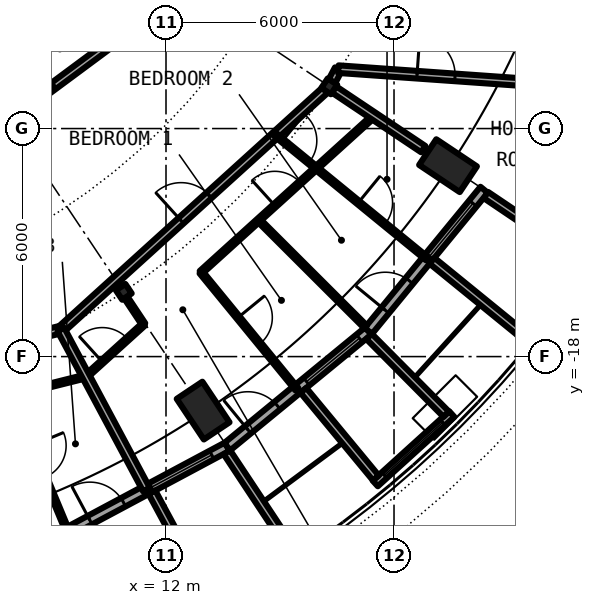
"""IFC4 building model, lengths in metres.
Left out: names, types, materials, properties, quantities, classifications, styles, units other than length and angle.
Written with IfcOpenShell. Run it as: python <this file> out.ifc"""

import sys

from ifc_helpers import new_model, si_unit, direction, frame, frame_2d, origin, origin_2d, place, context, subcontext, project, spatial, rectangle, circle, hollow_circle, i_section, extrude, element, fill, save


model = new_model("IFC4")
c1 = context("Model", 3, precision=1e-05, world=origin(), true_north=direction((0.0, 1.0)))
c2 = subcontext(c1, "Body", "Model", "MODEL_VIEW")
j1 = project(units=[si_unit("LENGTHUNIT", "METRE"), si_unit("PLANEANGLEUNIT", "RADIAN")], contexts=[c1])
p1 = place(None, origin())
s1 = spatial("IfcSite", under=j1, at=p1, CompositionType="ELEMENT")
p2 = place(p1, origin())
s2 = spatial("IfcBuilding", under=s1, at=p2, CompositionType="ELEMENT")
p3 = place(p2, frame((0.0, 0.0, 246.25)))
s3 = spatial("IfcBuildingStorey", under=s2, at=p3, CompositionType="ELEMENT", Elevation=246.25)
for number, where, z_axis, x_axis in (
    (1, (13.334, -19.955, 0.0), (-0.232, 0.347, 0.909), (-0.831, -0.556, 0.0)),
    (2, (19.955, -13.334, 0.0), (-0.347, 0.232, 0.909), (-0.556, -0.831, 0.0)),
):
    element("IfcColumn", number, at=place(p3, frame(where, z_axis=z_axis, x_axis=x_axis)), inside=s3, PredefinedType="COLUMN", context=c2, shape_type="SweptSolid", body=[
        extrude(hollow_circle(Radius=0.406, WallThickness=0.03, at=origin_2d()), origin(), (0.0, 0.0, 1.0), 3.081),
    ])
for number, where, z_axis, x_axis in (
    (3, (10.889, -16.297, 0.0), (0.0, 0.0, 1.0), (0.556, -0.831, 0.0)),
    (4, (16.297, -10.889, 0.0), (0.0, 0.0, 1.0), (0.831, -0.556, 0.0)),
):
    element("IfcColumn", number, at=place(p3, frame(where, z_axis=z_axis, x_axis=x_axis)), inside=s3, PredefinedType="COLUMN", context=c2, shape_type="SweptSolid", body=[
        extrude(i_section(OverallWidth=0.3, OverallDepth=0.3, WebThickness=0.011, FlangeThickness=0.019, FilletRadius=0.027, at=origin_2d()), origin(), (0.0, 0.0, 1.0), 3.05),
    ])
p4 = place(p3, frame((9.376, -22.635, 0.0), z_axis=(0.0, 0.0, 1.0), x_axis=(0.881903608701, 0.471429766731, 0.0)))
e5 = element("IfcWall", 5, at=p4, inside=s3, PredefinedType="SOLIDWALL", context=c2, shape_type="SweptSolid", body=[
    extrude(rectangle(XDim=4.802, YDim=0.25, at=frame_2d((2.401, 0.0))), origin(), (0.0, 0.0, 1.0), 2.7),
])
p5 = place(p4, frame((0.704, 0.0, 0.0)))
e6 = element("IfcOpeningElement", 6, at=p5, cuts=e5, PredefinedType="OPENING", context=c2, shape_type="SweptSolid", body=[
    extrude(rectangle(XDim=1.0, YDim=2.2, at=frame_2d((0.5, 1.1))), frame((0.0, 0.135, 0.0), z_axis=(0.0, -1.0, 0.0), x_axis=(1.0, 0.0, 0.0)), (0.0, 0.0, 1.0), 0.27),
])
p6 = place(p4, frame((2.542, 0.0, 0.3)))
e7 = element("IfcOpeningElement", 7, at=p6, cuts=e5, PredefinedType="OPENING", context=c2, shape_type="SweptSolid", body=[
    extrude(rectangle(XDim=1.8, YDim=2.1, at=frame_2d((0.9, 1.05))), frame((0.0, 0.135, 0.0), z_axis=(0.0, -1.0, 0.0), x_axis=(1.0, 0.0, 0.0)), (0.0, 0.0, 1.0), 0.27),
])
p7 = place(p3, frame((11.631, -21.572, -0.03), z_axis=(0.0, 0.0, 1.0), x_axis=(0.474649669009, -0.880174807473, 0.0)))
e8 = element("IfcWall", 8, at=p7, inside=s3, PredefinedType="SOLIDWALL", context=c2, shape_type="SweptSolid", body=[
    extrude(rectangle(XDim=2.991, YDim=0.2, at=frame_2d((1.496, 0.0))), origin(), (0.0, 0.0, 1.0), 2.73),
])
p8 = place(p3, frame((13.603, -20.518, -0.03), z_axis=(0.0, 0.0, 1.0), x_axis=(0.55248888476, -0.833520265031, 0.0)))
e9 = element("IfcWall", 9, at=p8, inside=s3, PredefinedType="SOLIDWALL", context=c2, shape_type="SweptSolid", body=[
    extrude(rectangle(XDim=2.882, YDim=0.2, at=frame_2d((1.441, 0.0))), origin(), (0.0, 0.0, 1.0), 2.73),
])
p9 = place(p3, frame((13.611, -20.371, 0.0), z_axis=(0.0, 0.0, 1.0), x_axis=(0.773007538262, 0.634396836208, 0.0)))
e10 = element("IfcWall", 10, at=p9, inside=s3, PredefinedType="SOLIDWALL", context=c2, shape_type="SweptSolid", body=[
    extrude(rectangle(XDim=4.803, YDim=0.25, at=frame_2d((2.402, 0.0))), origin(), (0.0, 0.0, 1.0), 2.7),
])
p10 = place(p9, frame((0.704, 0.0, 0.0)))
e11 = element("IfcOpeningElement", 11, at=p10, cuts=e10, PredefinedType="OPENING", context=c2, shape_type="SweptSolid", body=[
    extrude(rectangle(XDim=1.0, YDim=2.2, at=frame_2d((0.5, 1.1))), frame((0.0, 0.135, 0.0), z_axis=(0.0, -1.0, 0.0), x_axis=(1.0, 0.0, 0.0)), (0.0, 0.0, 1.0), 0.27),
])
p11 = place(p9, frame((2.699, 0.0, 0.3)))
e12 = element("IfcOpeningElement", 12, at=p11, cuts=e10, PredefinedType="OPENING", context=c2, shape_type="SweptSolid", body=[
    extrude(rectangle(XDim=1.8, YDim=2.1, at=frame_2d((0.9, 1.05))), frame((0.0, 0.135, 0.0), z_axis=(0.0, -1.0, 0.0), x_axis=(1.0, 0.0, 0.0)), (0.0, 0.0, 1.0), 0.27),
])
p12 = place(p3, frame((17.506, -21.338, -0.03), z_axis=(0.0, 0.0, 1.0), x_axis=(0.741016284298, 0.671487056022, 0.0)))
e13 = element("IfcWall", 13, at=p12, inside=s3, PredefinedType="SOLIDWALL", context=c2, shape_type="SweptSolid", body=[
    extrude(rectangle(XDim=2.718, YDim=0.2, at=frame_2d((1.359, 0.0))), origin(), (0.0, 0.0, 1.0), 2.73),
])
p13 = place(p12, frame((0.319, 0.0, 0.33)))
e14 = element("IfcOpeningElement", 14, at=p13, cuts=e13, PredefinedType="OPENING", context=c2, shape_type="SweptSolid", body=[
    extrude(circle(Radius=1.04, at=frame_2d((1.04, 1.04))), frame((0.0, 0.11, 0.0), z_axis=(0.0, -1.0, 0.0), x_axis=(1.0, 0.0, 0.0)), (0.0, 0.0, 1.0), 0.22),
])
p14 = place(p3, frame((15.615, -18.888, -0.03), z_axis=(0.0, 0.0, 1.0), x_axis=(0.637452521862, -0.770489638069, 0.0)))
e15 = element("IfcWall", 15, at=p14, inside=s3, PredefinedType="SOLIDWALL", context=c2, shape_type="SweptSolid", body=[
    extrude(rectangle(XDim=2.993, YDim=0.2, at=frame_2d((1.497, 0.0))), origin(), (0.0, 0.0, 1.0), 2.73),
])
p15 = place(p3, frame((17.344, -17.47, -0.03), z_axis=(0.0, 0.0, 1.0), x_axis=(0.704306055012, -0.709896457854, 0.0)))
e16 = element("IfcWall", 16, at=p15, inside=s3, PredefinedType="SOLIDWALL", context=c2, shape_type="SweptSolid", body=[
    extrude(rectangle(XDim=2.882, YDim=0.2, at=frame_2d((1.441, 0.0))), origin(), (0.0, 0.0, 1.0), 2.73),
])
p16 = place(p3, frame((17.324, -17.324, 0.0), z_axis=(0.0, 0.0, 1.0), x_axis=(0.634396836208, 0.773007538262, 0.0)))
e17 = element("IfcWall", 17, at=p16, inside=s3, PredefinedType="SOLIDWALL", context=c2, shape_type="SweptSolid", body=[
    extrude(rectangle(XDim=4.803, YDim=0.25, at=frame_2d((2.402, 0.0))), origin(), (0.0, 0.0, 1.0), 2.7),
])
p17 = place(p16, frame((0.704, 0.0, 0.0)))
e18 = element("IfcOpeningElement", 18, at=p17, cuts=e17, PredefinedType="OPENING", context=c2, shape_type="SweptSolid", body=[
    extrude(rectangle(XDim=1.0, YDim=2.2, at=frame_2d((0.5, 1.1))), frame((0.0, 0.135, 0.0), z_axis=(0.0, -1.0, 0.0), x_axis=(1.0, 0.0, 0.0)), (0.0, 0.0, 1.0), 0.27),
])
p18 = place(p16, frame((2.542, 0.0, 0.3)))
e19 = element("IfcOpeningElement", 19, at=p18, cuts=e17, PredefinedType="OPENING", context=c2, shape_type="SweptSolid", body=[
    extrude(rectangle(XDim=1.8, YDim=2.1, at=frame_2d((0.9, 1.05))), frame((0.0, 0.135, 0.0), z_axis=(0.0, -1.0, 0.0), x_axis=(1.0, 0.0, 0.0)), (0.0, 0.0, 1.0), 0.27),
])
p19 = place(p3, frame((19.0, -15.479, -0.03), z_axis=(0.0, 0.0, 1.0), x_axis=(0.775612161439, -0.631209771017, 0.0)))
e20 = element("IfcWall", 20, at=p19, inside=s3, PredefinedType="SOLIDWALL", context=c2, shape_type="SweptSolid", body=[
    extrude(rectangle(XDim=2.992, YDim=0.2, at=frame_2d((1.496, 0.0))), origin(), (0.0, 0.0, 1.0), 2.73),
])
p20 = place(p3, frame((20.419, -13.75, -0.03), z_axis=(0.0, 0.0, 1.0), x_axis=(0.829211810515, -0.558934498222, 0.0)))
e21 = element("IfcWall", 21, at=p20, inside=s3, PredefinedType="SOLIDWALL", context=c2, shape_type="SweptSolid", body=[
    extrude(rectangle(XDim=2.882, YDim=0.2, at=frame_2d((1.441, 0.0))), origin(), (0.0, 0.0, 1.0), 2.73),
])
p21 = place(p3, frame((3.959, -20.008, 0.0), z_axis=(0.0, 0.0, 1.0), x_axis=(0.970025123496, 0.243004649721, 0.0)))
e22 = element("IfcWall", 22, at=p21, inside=s3, PredefinedType="PARTITIONING", context=c2, shape_type="SweptSolid", body=[
    extrude(rectangle(XDim=6.124, YDim=0.1, at=frame_2d((3.062, 0.0))), origin(), (0.0, 0.0, 1.0), 2.7),
])
p22 = place(p21, frame((2.612, 0.0, 0.0)))
e23 = element("IfcOpeningElement", 23, at=p22, cuts=e22, PredefinedType="OPENING", context=c2, shape_type="SweptSolid", body=[
    extrude(rectangle(XDim=0.9, YDim=2.3, at=frame_2d((0.45, 1.15))), frame((0.0, 0.06, 0.0), z_axis=(0.0, -1.0, 0.0), x_axis=(1.0, 0.0, 0.0)), (0.0, 0.0, 1.0), 0.12),
])
p23 = place(p3, frame((9.899, -18.52, 0.0), z_axis=(0.0, 0.0, 1.0), x_axis=(0.741280718106, 0.671195125849, 0.0)))
e24 = element("IfcWall", 24, at=p23, inside=s3, PredefinedType="PARTITIONING", context=c2, shape_type="SweptSolid", body=[
    extrude(rectangle(XDim=2.041, YDim=0.1, at=frame_2d((1.021, 0.0))), origin(), (0.0, 0.0, 1.0), 2.7),
])
p24 = place(p23, frame((0.571, 0.0, 0.0)))
e25 = element("IfcOpeningElement", 25, at=p24, cuts=e24, PredefinedType="OPENING", context=c2, shape_type="SweptSolid", body=[
    extrude(rectangle(XDim=0.9, YDim=2.3, at=frame_2d((0.45, 1.15))), frame((0.0, 0.06, 0.0), z_axis=(0.0, -1.0, 0.0), x_axis=(1.0, 0.0, 0.0)), (0.0, 0.0, 1.0), 0.12),
])
p25 = place(p3, frame((12.92, -15.785, 0.0), z_axis=(0.0, 0.0, 1.0), x_axis=(0.74123210671, 0.671248809297, 0.0)))
e26 = element("IfcWall", 26, at=p25, inside=s3, PredefinedType="PARTITIONING", context=c2, shape_type="SweptSolid", body=[
    extrude(rectangle(XDim=6.115, YDim=0.1, at=frame_2d((3.058, 0.0))), origin(), (0.0, 0.0, 1.0), 2.7),
])
p26 = place(p25, frame((2.622, 0.0, 0.0)))
e27 = element("IfcOpeningElement", 27, at=p26, cuts=e26, PredefinedType="OPENING", context=c2, shape_type="SweptSolid", body=[
    extrude(rectangle(XDim=0.9, YDim=2.3, at=frame_2d((0.45, 1.15))), frame((0.0, 0.06, 0.0), z_axis=(0.0, -1.0, 0.0), x_axis=(1.0, 0.0, 0.0)), (0.0, 0.0, 1.0), 0.12),
])
p27 = place(p3, frame((16.367, -10.756, 0.0), z_axis=(0.0, 0.0, 1.0), x_axis=(0.465802239822, 0.884888848035, 0.0)))
e28 = element("IfcWall", 28, at=p27, inside=s3, PredefinedType="PARTITIONING", context=c2, shape_type="SweptSolid", body=[
    extrude(rectangle(XDim=0.361, YDim=0.2, at=frame_2d((0.18, 0.0))), origin(), (0.0, 0.0, 1.0), 2.7),
])
p28 = place(p3, frame((-0.001, -19.6, 0.0), z_axis=(0.0, 0.0, 1.0), x_axis=(0.970038381136, 0.242951721795, 0.0)))
e29 = element("IfcWall", 29, at=p28, inside=s3, PredefinedType="PARTITIONING", context=c2, shape_type="SweptSolid", body=[
    extrude(rectangle(XDim=9.525, YDim=0.2, at=frame_2d((4.763, 0.0))), origin(), (0.0, 0.0, 1.0), 2.45),
])
p29 = place(p28, frame((4.266, 0.0, 0.0)))
e30 = element("IfcOpeningElement", 30, at=p29, cuts=e29, PredefinedType="OPENING", context=c2, shape_type="SweptSolid", body=[
    extrude(rectangle(XDim=1.0, YDim=2.3, at=frame_2d((0.5, 1.15))), frame((0.0, 0.11, 0.0), z_axis=(0.0, -1.0, 0.0), x_axis=(1.0, 0.0, 0.0)), (0.0, 0.0, 1.0), 0.22),
])
p30 = place(p3, frame((9.239, -17.286, 0.0), z_axis=(0.0, 0.0, 1.0), x_axis=(0.740934281602, 0.671577538596, 0.0)))
e31 = element("IfcWall", 31, at=p30, inside=s3, PredefinedType="PARTITIONING", context=c2, shape_type="SweptSolid", body=[
    extrude(rectangle(XDim=9.37, YDim=0.2, at=frame_2d((4.685, 0.0))), origin(), (0.0, 0.0, 1.0), 2.45),
])
p31 = place(p30, frame((4.263, 0.0, 0.0)))
e32 = element("IfcOpeningElement", 32, at=p31, cuts=e31, PredefinedType="OPENING", context=c2, shape_type="SweptSolid", body=[
    extrude(rectangle(XDim=1.0, YDim=2.3, at=frame_2d((0.5, 1.15))), frame((0.0, 0.11, 0.0), z_axis=(0.0, -1.0, 0.0), x_axis=(1.0, 0.0, 0.0)), (0.0, 0.0, 1.0), 0.22),
])
p32 = place(p3, frame((4.354, -14.354, 0.0), z_axis=(0.0, 0.0, 1.0), x_axis=(0.80330975478, 0.595561447607, 0.0)))
e33 = element("IfcWall", 33, at=p32, inside=s3, PredefinedType="PARTITIONING", context=c2, shape_type="SweptSolid", body=[
    extrude(rectangle(XDim=8.987, YDim=0.2, at=frame_2d((4.493, 0.0))), origin(), (0.0, 0.0, 1.0), 2.7),
])
p33 = place(p32, frame((3.832, 0.0, 0.0)))
e34 = element("IfcOpeningElement", 34, at=p33, cuts=e33, PredefinedType="OPENING", context=c2, shape_type="SweptSolid", body=[
    extrude(rectangle(XDim=1.0, YDim=2.3, at=frame_2d((0.5, 1.15))), frame((0.0, 0.11, 0.0), z_axis=(0.0, -1.0, 0.0), x_axis=(1.0, 0.0, 0.0)), (0.0, 0.0, 1.0), 0.22),
])
p34 = place(p3, frame((16.535, -10.437, 0.0), z_axis=(0.0, 0.0, 1.0), x_axis=(0.997515141784, -0.070452408845, 0.0)))
e35 = element("IfcWall", 35, at=p34, inside=s3, PredefinedType="PARTITIONING", context=c2, shape_type="SweptSolid", body=[
    extrude(rectangle(XDim=5.153, YDim=0.2, at=frame_2d((2.576, 0.0))), origin(), (0.0, 0.0, 1.0), 2.7),
])
p35 = place(p34, frame((2.076, 0.0, 0.0)))
e36 = element("IfcOpeningElement", 36, at=p35, cuts=e35, PredefinedType="OPENING", context=c2, shape_type="SweptSolid", body=[
    extrude(rectangle(XDim=1.0, YDim=2.3, at=frame_2d((0.5, 1.15))), frame((0.0, 0.11, 0.0), z_axis=(0.0, -1.0, 0.0), x_axis=(1.0, 0.0, 0.0)), (0.0, 0.0, 1.0), 0.22),
])
p36 = place(p3, frame((9.234, -17.289, 0.0), z_axis=(0.0, 0.0, 1.0), x_axis=(0.471710500702, -0.881753482288, 0.0)))
e37 = element("IfcWall", 37, at=p36, inside=s3, PredefinedType="PARTITIONING", context=c2, shape_type="SweptSolid", body=[
    extrude(rectangle(XDim=4.774, YDim=0.2, at=frame_2d((2.387, 0.0))), origin(), (0.0, 0.0, 1.0), 2.7),
])
p37 = place(p3, frame((4.909, -5.958, 0.0), z_axis=(0.0, 0.0, 1.0), x_axis=(0.635941750694, -0.771737059965, 0.0)))
e38 = element("IfcWall", 38, at=p37, inside=s3, PredefinedType="PARTITIONING", context=c2, shape_type="SweptSolid", body=[
    extrude(rectangle(XDim=6.422, YDim=0.1, at=frame_2d((3.211, 0.0))), origin(), (0.0, 0.0, 1.0), 2.7),
])
p38 = place(p37, frame((4.699, 0.0, 0.0)))
e39 = element("IfcOpeningElement", 39, at=p38, cuts=e38, PredefinedType="OPENING", context=c2, shape_type="SweptSolid", body=[
    extrude(rectangle(XDim=0.9, YDim=2.3, at=frame_2d((0.45, 1.15))), frame((0.0, 0.06, 0.0), z_axis=(0.0, -1.0, 0.0), x_axis=(1.0, 0.0, 0.0)), (0.0, 0.0, 1.0), 0.12),
])
p39 = place(p37, frame((1.488, 0.0, 0.0)))
e40 = element("IfcOpeningElement", 40, at=p39, cuts=e38, PredefinedType="OPENING", context=c2, shape_type="SweptSolid", body=[
    extrude(rectangle(XDim=0.9, YDim=2.3, at=frame_2d((0.45, 1.15))), frame((0.0, 0.06, 0.0), z_axis=(0.0, -1.0, 0.0), x_axis=(1.0, 0.0, 0.0)), (0.0, 0.0, 1.0), 0.12),
])
p40 = place(p3, frame((7.391, -17.749, 0.0), z_axis=(0.0, 0.0, 1.0), x_axis=(0.38454804651, -0.923104977738, 0.0)))
e41 = element("IfcWall", 41, at=p40, inside=s3, PredefinedType="PARTITIONING", context=c2, shape_type="SweptSolid", body=[
    extrude(rectangle(XDim=5.149, YDim=0.1, at=frame_2d((2.574, 0.0))), origin(), (0.0, 0.0, 1.0), 2.7),
])
p41 = place(p40, frame((0.237, 0.0, 0.0)))
e42 = element("IfcOpeningElement", 42, at=p41, cuts=e41, PredefinedType="OPENING", context=c2, shape_type="SweptSolid", body=[
    extrude(rectangle(XDim=0.9, YDim=2.3, at=frame_2d((0.45, 1.15))), frame((0.0, 0.06, 0.0), z_axis=(0.0, -1.0, 0.0), x_axis=(1.0, 0.0, 0.0)), (0.0, 0.0, 1.0), 0.12),
])
p42 = place(p40, frame((2.811, 0.0, 0.0)))
e43 = element("IfcOpeningElement", 43, at=p42, cuts=e41, PredefinedType="OPENING", context=c2, shape_type="SweptSolid", body=[
    extrude(rectangle(XDim=0.9, YDim=2.3, at=frame_2d((0.45, 1.15))), frame((0.0, 0.06, 0.0), z_axis=(0.0, -1.0, 0.0), x_axis=(1.0, 0.0, 0.0)), (0.0, 0.0, 1.0), 0.12),
])
p43 = place(p3, frame((10.941, -16.442, 0.0), z_axis=(0.0, 0.0, 1.0), x_axis=(0.554037560198, -0.832491670763, 0.0)))
e44 = element("IfcWall", 44, at=p43, inside=s3, PredefinedType="PARTITIONING", context=c2, shape_type="SweptSolid", body=[
    extrude(rectangle(XDim=0.851, YDim=0.1, at=frame_2d((0.425, 0.0))), origin(), (0.0, 0.0, 1.0), 2.7),
])
p44 = place(p3, frame((12.922, -15.78, 0.0), z_axis=(0.0, 0.0, 1.0), x_axis=(0.633648720881, -0.77362090104, 0.0)))
e45 = element("IfcWall", 45, at=p44, inside=s3, PredefinedType="PARTITIONING", context=c2, shape_type="SweptSolid", body=[
    extrude(rectangle(XDim=3.979, YDim=0.1, at=frame_2d((1.989, 0.0))), origin(), (0.0, 0.0, 1.0), 2.7),
])
p45 = place(p44, frame((1.54, 0.0, 0.0)))
e46 = element("IfcOpeningElement", 46, at=p45, cuts=e45, PredefinedType="OPENING", context=c2, shape_type="SweptSolid", body=[
    extrude(rectangle(XDim=0.9, YDim=2.3, at=frame_2d((0.45, 1.15))), frame((0.0, 0.06, 0.0), z_axis=(0.0, -1.0, 0.0), x_axis=(1.0, 0.0, 0.0)), (0.0, 0.0, 1.0), 0.12),
])
p46 = place(p3, frame((14.436, -14.408, 0.0), z_axis=(0.0, 0.0, 1.0), x_axis=(0.707720109647, -0.706492920277, 0.0)))
e47 = element("IfcWall", 47, at=p46, inside=s3, PredefinedType="PARTITIONING", context=c2, shape_type="SweptSolid", body=[
    extrude(rectangle(XDim=3.979, YDim=0.1, at=frame_2d((1.989, 0.0))), origin(), (0.0, 0.0, 1.0), 2.7),
])
p47 = place(p3, frame((14.885, -12.168, 0.0), z_axis=(0.0, 0.0, 1.0), x_axis=(0.774252940636, -0.632876278522, 0.0)))
e48 = element("IfcWall", 48, at=p47, inside=s3, PredefinedType="PARTITIONING", context=c2, shape_type="SweptSolid", body=[
    extrude(rectangle(XDim=5.15, YDim=0.1, at=frame_2d((2.575, 0.0))), origin(), (0.0, 0.0, 1.0), 2.7),
])
p48 = place(p47, frame((0.237, 0.0, 0.0)))
e49 = element("IfcOpeningElement", 49, at=p48, cuts=e48, PredefinedType="OPENING", context=c2, shape_type="SweptSolid", body=[
    extrude(rectangle(XDim=0.9, YDim=2.3, at=frame_2d((0.45, 1.15))), frame((0.0, 0.06, 0.0), z_axis=(0.0, -1.0, 0.0), x_axis=(1.0, 0.0, 0.0)), (0.0, 0.0, 1.0), 0.12),
])
p49 = place(p47, frame((2.812, 0.0, 0.0)))
e50 = element("IfcOpeningElement", 50, at=p49, cuts=e48, PredefinedType="OPENING", context=c2, shape_type="SweptSolid", body=[
    extrude(rectangle(XDim=0.9, YDim=2.3, at=frame_2d((0.45, 1.15))), frame((0.0, 0.06, 0.0), z_axis=(0.0, -1.0, 0.0), x_axis=(1.0, 0.0, 0.0)), (0.0, 0.0, 1.0), 0.12),
])
p50 = place(p3, frame((16.422, -10.972, 0.0), z_axis=(0.0, 0.0, 1.0), x_axis=(0.83131782921, -0.555797325324, 0.0)))
e51 = element("IfcWall", 51, at=p50, inside=s3, PredefinedType="PARTITIONING", context=c2, shape_type="SweptSolid", body=[
    extrude(rectangle(XDim=2.823, YDim=0.2, at=frame_2d((1.412, 0.0))), origin(), (0.0, 0.0, 1.0), 2.7),
])
p51 = place(p5, origin())
e52 = element("IfcDoor", 52, at=p51, inside=s3, OperationType="SINGLE_SWING_LEFT", PredefinedType="DOOR", context=c2, shape_type="SweptSolid", body=[
    extrude(rectangle(XDim=1.0, YDim=2.2, at=frame_2d((0.5, 1.1))), frame((0.0, 0.025, 0.0), z_axis=(0.0, -1.0, 0.0), x_axis=(1.0, 0.0, 0.0)), (0.0, 0.0, 1.0), 0.05),
])
fill(e6, e52)
p52 = place(p6, origin())
e53 = element("IfcWindow", 53, at=p52, inside=s3, PartitioningType="SINGLE_PANEL", PredefinedType="WINDOW", context=c2, shape_type="SweptSolid", body=[
    extrude(rectangle(XDim=1.8, YDim=2.1, at=frame_2d((0.9, 1.05))), frame((0.0, 0.03, 0.0), z_axis=(0.0, -1.0, 0.0), x_axis=(1.0, 0.0, 0.0)), (0.0, 0.0, 1.0), 0.06),
])
fill(e7, e53)
p53 = place(p10, origin())
e54 = element("IfcDoor", 54, at=p53, inside=s3, OperationType="SINGLE_SWING_LEFT", PredefinedType="DOOR", context=c2, shape_type="SweptSolid", body=[
    extrude(rectangle(XDim=1.0, YDim=2.2, at=frame_2d((0.5, 1.1))), frame((0.0, 0.025, 0.0), z_axis=(0.0, -1.0, 0.0), x_axis=(1.0, 0.0, 0.0)), (0.0, 0.0, 1.0), 0.05),
])
fill(e11, e54)
p54 = place(p11, origin())
e55 = element("IfcWindow", 55, at=p54, inside=s3, PartitioningType="SINGLE_PANEL", PredefinedType="WINDOW", context=c2, shape_type="SweptSolid", body=[
    extrude(rectangle(XDim=1.8, YDim=2.1, at=frame_2d((0.9, 1.05))), frame((0.0, 0.03, 0.0), z_axis=(0.0, -1.0, 0.0), x_axis=(1.0, 0.0, 0.0)), (0.0, 0.0, 1.0), 0.06),
])
fill(e12, e55)
p55 = place(p13, origin())
e56 = element("IfcWindow", 56, at=p55, inside=s3, PartitioningType="SINGLE_PANEL", PredefinedType="WINDOW", context=c2, shape_type="SweptSolid", body=[
    extrude(circle(Radius=1.04, at=frame_2d((1.04, 1.04))), frame((0.0, 0.03, 0.0), z_axis=(0.0, -1.0, 0.0), x_axis=(1.0, 0.0, 0.0)), (0.0, 0.0, 1.0), 0.06),
])
fill(e14, e56)
p56 = place(p17, origin())
e57 = element("IfcDoor", 57, at=p56, inside=s3, OperationType="SINGLE_SWING_LEFT", PredefinedType="DOOR", context=c2, shape_type="SweptSolid", body=[
    extrude(rectangle(XDim=1.0, YDim=2.2, at=frame_2d((0.5, 1.1))), frame((0.0, 0.025, 0.0), z_axis=(0.0, -1.0, 0.0), x_axis=(1.0, 0.0, 0.0)), (0.0, 0.0, 1.0), 0.05),
])
fill(e18, e57)
p57 = place(p18, origin())
e58 = element("IfcWindow", 58, at=p57, inside=s3, PartitioningType="SINGLE_PANEL", PredefinedType="WINDOW", context=c2, shape_type="SweptSolid", body=[
    extrude(rectangle(XDim=1.8, YDim=2.1, at=frame_2d((0.9, 1.05))), frame((0.0, 0.03, 0.0), z_axis=(0.0, -1.0, 0.0), x_axis=(1.0, 0.0, 0.0)), (0.0, 0.0, 1.0), 0.06),
])
fill(e19, e58)
p58 = place(p31, origin())
e59 = element("IfcDoor", 59, at=p58, inside=s3, OperationType="SINGLE_SWING_RIGHT", PredefinedType="DOOR", context=c2, shape_type="SweptSolid", body=[
    extrude(rectangle(XDim=1.0, YDim=2.3, at=frame_2d((0.5, 1.15))), frame((0.0, 0.025, 0.0), z_axis=(0.0, -1.0, 0.0), x_axis=(1.0, 0.0, 0.0)), (0.0, 0.0, 1.0), 0.05),
])
fill(e32, e59)
p59 = place(p24, origin())
e60 = element("IfcDoor", 60, at=p59, inside=s3, OperationType="SINGLE_SWING_LEFT", PredefinedType="DOOR", context=c2, shape_type="SweptSolid", body=[
    extrude(rectangle(XDim=0.9, YDim=2.3, at=frame_2d((0.45, 1.15))), frame((0.0, 0.025, 0.0), z_axis=(0.0, -1.0, 0.0), x_axis=(1.0, 0.0, 0.0)), (0.0, 0.0, 1.0), 0.05),
])
fill(e25, e60)
p60 = place(p48, origin())
e61 = element("IfcDoor", 61, at=p60, inside=s3, OperationType="SINGLE_SWING_LEFT", PredefinedType="DOOR", context=c2, shape_type="SweptSolid", body=[
    extrude(rectangle(XDim=0.9, YDim=2.3, at=frame_2d((0.45, 1.15))), frame((0.0, 0.025, 0.0), z_axis=(0.0, -1.0, 0.0), x_axis=(1.0, 0.0, 0.0)), (0.0, 0.0, 1.0), 0.05),
])
fill(e49, e61)
p61 = place(p45, origin())
e62 = element("IfcDoor", 62, at=p61, inside=s3, OperationType="SINGLE_SWING_RIGHT", PredefinedType="DOOR", context=c2, shape_type="SweptSolid", body=[
    extrude(rectangle(XDim=0.9, YDim=2.3, at=frame_2d((0.45, 1.15))), frame((0.0, 0.025, 0.0), z_axis=(0.0, -1.0, 0.0), x_axis=(1.0, 0.0, 0.0)), (0.0, 0.0, 1.0), 0.05),
])
fill(e46, e62)
p62 = place(p26, origin())
e63 = element("IfcDoor", 63, at=p62, inside=s3, OperationType="SINGLE_SWING_RIGHT", PredefinedType="DOOR", context=c2, shape_type="SweptSolid", body=[
    extrude(rectangle(XDim=0.9, YDim=2.3, at=frame_2d((0.45, 1.15))), frame((0.0, 0.025, 0.0), z_axis=(0.0, -1.0, 0.0), x_axis=(1.0, 0.0, 0.0)), (0.0, 0.0, 1.0), 0.05),
])
fill(e27, e63)
p63 = place(p49, origin())
e64 = element("IfcDoor", 64, at=p63, inside=s3, OperationType="SINGLE_SWING_RIGHT", PredefinedType="DOOR", context=c2, shape_type="SweptSolid", body=[
    extrude(rectangle(XDim=0.9, YDim=2.3, at=frame_2d((0.45, 1.15))), frame((0.0, 0.025, 0.0), z_axis=(0.0, -1.0, 0.0), x_axis=(1.0, 0.0, 0.0)), (0.0, 0.0, 1.0), 0.05),
])
fill(e50, e64)
p64 = place(p35, origin())
e65 = element("IfcDoor", 65, at=p64, inside=s3, OperationType="SINGLE_SWING_LEFT", PredefinedType="DOOR", context=c2, shape_type="SweptSolid", body=[
    extrude(rectangle(XDim=1.0, YDim=2.3, at=frame_2d((0.5, 1.15))), frame((0.0, 0.025, 0.0), z_axis=(0.0, -1.0, 0.0), x_axis=(1.0, 0.0, 0.0)), (0.0, 0.0, 1.0), 0.05),
])
fill(e36, e65)
save(model, sys.argv[1])
